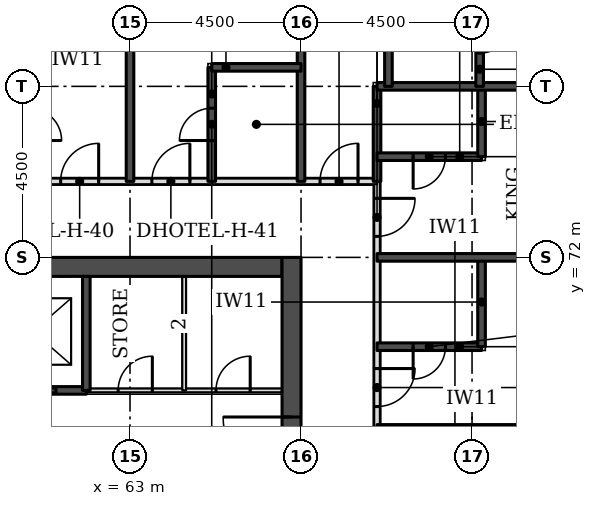
"""IFC4 building model, lengths in metres.
Left out: names, types, materials, properties, quantities, classifications, styles, units other than length and angle.
Written with IfcOpenShell. Run it as: python <this file> out.ifc"""

import sys

from ifc_helpers import new_model, si_unit, direction, frame, frame_2d, origin, place, context, subcontext, project, spatial, rectangle, extrude, element, fill, save


model = new_model("IFC4")
c1 = context("Model", 3, precision=1e-05, world=origin(), true_north=direction((0.0, 1.0)))
c2 = subcontext(c1, "Body", "Model", "MODEL_VIEW")
j1 = project(units=[si_unit("LENGTHUNIT", "METRE"), si_unit("PLANEANGLEUNIT", "RADIAN")], contexts=[c1])
p1 = place(None, origin())
s1 = spatial("IfcSite", under=j1, at=p1, CompositionType="ELEMENT")
p2 = place(p1, origin())
s2 = spatial("IfcBuilding", under=s1, at=p2, CompositionType="ELEMENT")
p3 = place(p2, frame((0.0, 0.0, 46.2)))
s3 = spatial("IfcBuildingStorey", under=s2, at=p3, CompositionType="ELEMENT", Elevation=46.2)
p4 = place(p3, frame((45.5, 71.75, 0.0), z_axis=(0.0, 0.0, 1.0), x_axis=(1.0, 0.0, 0.0)))
e1 = element("IfcWall", 1, at=p4, inside=s3, PredefinedType="SHEAR", context=c2, shape_type="SweptSolid", body=[
    extrude(rectangle(XDim=21.5, YDim=0.5, at=frame_2d((10.75, 0.0))), origin(), (0.0, 0.0, 1.0), 3.3),
])
p5 = place(p3, frame((67.25, 49.5, 0.0), z_axis=(0.0, 0.0, 1.0), x_axis=(0.0, 1.0, 0.0)))
e2 = element("IfcWall", 2, at=p5, inside=s3, PredefinedType="SHEAR", context=c2, shape_type="SweptSolid", body=[
    extrude(rectangle(XDim=22.5, YDim=0.5, at=frame_2d((11.25, 0.0))), origin(), (0.0, 0.0, 1.0), 3.3),
])
p6 = place(p5, frame((4.2, 0.0, 0.0)))
e3 = element("IfcOpeningElement", 3, at=p6, cuts=e2, PredefinedType="OPENING", context=c2, shape_type="SweptSolid", body=[
    extrude(rectangle(XDim=1.8, YDim=2.1, at=frame_2d((0.9, 1.05))), frame((0.0, 0.26, 0.0), z_axis=(0.0, -1.0, 0.0), x_axis=(1.0, 0.0, 0.0)), (0.0, 0.0, 1.0), 0.52),
])
p7 = place(p5, frame((6.9, 0.0, 0.0)))
e4 = element("IfcOpeningElement", 4, at=p7, cuts=e2, PredefinedType="OPENING", context=c2, shape_type="SweptSolid", body=[
    extrude(rectangle(XDim=1.1, YDim=2.1, at=frame_2d((0.55, 1.05))), frame((0.0, 0.26, 0.0), z_axis=(0.0, -1.0, 0.0), x_axis=(1.0, 0.0, 0.0)), (0.0, 0.0, 1.0), 0.52),
])
p8 = place(p5, frame((13.6, 0.0, 0.0)))
e5 = element("IfcOpeningElement", 5, at=p8, cuts=e2, PredefinedType="OPENING", context=c2, shape_type="SweptSolid", body=[
    extrude(rectangle(XDim=1.1, YDim=2.1, at=frame_2d((0.55, 1.05))), frame((0.0, 0.26, 0.0), z_axis=(0.0, -1.0, 0.0), x_axis=(1.0, 0.0, 0.0)), (0.0, 0.0, 1.0), 0.52),
])
p9 = place(p5, frame((16.5, 0.0, 0.0)))
e6 = element("IfcOpeningElement", 6, at=p9, cuts=e2, PredefinedType="OPENING", context=c2, shape_type="SweptSolid", body=[
    extrude(rectangle(XDim=1.8, YDim=2.1, at=frame_2d((0.9, 1.05))), frame((0.0, 0.26, 0.0), z_axis=(0.0, -1.0, 0.0), x_axis=(1.0, 0.0, 0.0)), (0.0, 0.0, 1.0), 0.52),
])
p10 = place(p3, frame((77.326, 76.77, 0.0), z_axis=(0.0, 0.0, 1.0), x_axis=(-0.707106781187, 0.707106781187, 0.0)))
e7 = element("IfcWall", 7, at=p10, inside=s3, PredefinedType="STANDARD", context=c2, shape_type="SweptSolid", body=[
    extrude(rectangle(XDim=7.151, YDim=0.35, at=frame_2d((3.576, 0.0))), origin(), (0.0, 0.0, 1.0), 3.055),
])
p11 = place(p10, frame((1.926, 0.0, 0.8)))
e8 = element("IfcOpeningElement", 8, at=p11, cuts=e7, PredefinedType="OPENING", context=c2, shape_type="SweptSolid", body=[
    extrude(rectangle(XDim=3.3, YDim=1.5, at=frame_2d((1.65, 0.75))), frame((0.0, 0.185, 0.0), z_axis=(0.0, -1.0, 0.0), x_axis=(1.0, 0.0, 0.0)), (0.0, 0.0, 1.0), 0.37),
])
p12 = place(p3, frame((69.5, 47.5, 0.0), z_axis=(0.0, 0.0, 1.0), x_axis=(0.0, 1.0, 0.0)))
e9 = element("IfcWall", 9, at=p12, inside=s3, PredefinedType="PARTITIONING", context=c2, shape_type="SweptSolid", body=[
    extrude(rectangle(XDim=26.5, YDim=0.15, at=frame_2d((13.25, 0.0))), origin(), (0.0, 0.0, 1.0), 3.08),
])
p13 = place(p12, frame((25.053, 0.0, 0.0)))
e10 = element("IfcOpeningElement", 10, at=p13, cuts=e9, PredefinedType="OPENING", context=c2, shape_type="SweptSolid", body=[
    extrude(rectangle(XDim=1.0, YDim=2.1, at=frame_2d((0.5, 1.05))), frame((0.0, 0.085, 0.0), z_axis=(0.0, -1.0, 0.0), x_axis=(1.0, 0.0, 0.0)), (0.0, 0.0, 1.0), 0.17),
])
p14 = place(p12, frame((20.575, 0.0, 0.0)))
e11 = element("IfcOpeningElement", 11, at=p14, cuts=e9, PredefinedType="OPENING", context=c2, shape_type="SweptSolid", body=[
    extrude(rectangle(XDim=1.0, YDim=2.1, at=frame_2d((0.5, 1.05))), frame((0.0, 0.085, 0.0), z_axis=(0.0, -1.0, 0.0), x_axis=(1.0, 0.0, 0.0)), (0.0, 0.0, 1.0), 0.17),
])
p15 = place(p12, frame((18.175, 0.0, 0.0)))
e12 = element("IfcOpeningElement", 12, at=p15, cuts=e9, PredefinedType="OPENING", context=c2, shape_type="SweptSolid", body=[
    extrude(rectangle(XDim=1.0, YDim=2.1, at=frame_2d((0.5, 1.05))), frame((0.0, 0.085, 0.0), z_axis=(0.0, -1.0, 0.0), x_axis=(1.0, 0.0, 0.0)), (0.0, 0.0, 1.0), 0.17),
])
p16 = place(p12, frame((11.575, 0.0, 0.0)))
e13 = element("IfcOpeningElement", 13, at=p16, cuts=e9, PredefinedType="OPENING", context=c2, shape_type="SweptSolid", body=[
    extrude(rectangle(XDim=1.0, YDim=2.1, at=frame_2d((0.5, 1.05))), frame((0.0, 0.085, 0.0), z_axis=(0.0, -1.0, 0.0), x_axis=(1.0, 0.0, 0.0)), (0.0, 0.0, 1.0), 0.17),
])
p17 = place(p12, frame((7.65, 0.0, 0.0)))
e14 = element("IfcOpeningElement", 14, at=p17, cuts=e9, PredefinedType="OPENING", context=c2, shape_type="SweptSolid", body=[
    extrude(rectangle(XDim=1.1, YDim=2.1, at=frame_2d((0.55, 1.05))), frame((0.0, 0.085, 0.0), z_axis=(0.0, -1.0, 0.0), x_axis=(1.0, 0.0, 0.0)), (0.0, 0.0, 1.0), 0.17),
])
p18 = place(p12, frame((0.447, 0.0, 0.0)))
e15 = element("IfcOpeningElement", 15, at=p18, cuts=e9, PredefinedType="OPENING", context=c2, shape_type="SweptSolid", body=[
    extrude(rectangle(XDim=1.0, YDim=2.1, at=frame_2d((0.5, 1.05))), frame((0.0, 0.085, 0.0), z_axis=(0.0, -1.0, 0.0), x_axis=(1.0, 0.0, 0.0)), (0.0, 0.0, 1.0), 0.17),
])
p19 = place(p3, frame((43.0, 74.0, 0.0), z_axis=(0.0, 0.0, 1.0), x_axis=(1.0, 0.0, 0.0)))
e16 = element("IfcWall", 16, at=p19, inside=s3, PredefinedType="PARTITIONING", context=c2, shape_type="SweptSolid", body=[
    extrude(rectangle(XDim=26.5, YDim=0.15, at=frame_2d((13.25, 0.0))), origin(), (0.0, 0.0, 1.0), 3.08),
])
p20 = place(p19, frame((2.575, 0.0, 0.0)))
e17 = element("IfcOpeningElement", 17, at=p20, cuts=e16, PredefinedType="OPENING", context=c2, shape_type="SweptSolid", body=[
    extrude(rectangle(XDim=1.0, YDim=2.1, at=frame_2d((0.5, 1.05))), frame((0.0, 0.085, 0.0), z_axis=(0.0, -1.0, 0.0), x_axis=(1.0, 0.0, 0.0)), (0.0, 0.0, 1.0), 0.17),
])
p21 = place(p19, frame((9.175, 0.0, 0.0)))
e18 = element("IfcOpeningElement", 18, at=p21, cuts=e16, PredefinedType="OPENING", context=c2, shape_type="SweptSolid", body=[
    extrude(rectangle(XDim=1.0, YDim=2.1, at=frame_2d((0.5, 1.05))), frame((0.0, 0.085, 0.0), z_axis=(0.0, -1.0, 0.0), x_axis=(1.0, 0.0, 0.0)), (0.0, 0.0, 1.0), 0.17),
])
p22 = place(p19, frame((11.575, 0.0, 0.0)))
e19 = element("IfcOpeningElement", 19, at=p22, cuts=e16, PredefinedType="OPENING", context=c2, shape_type="SweptSolid", body=[
    extrude(rectangle(XDim=1.0, YDim=2.1, at=frame_2d((0.5, 1.05))), frame((0.0, 0.085, 0.0), z_axis=(0.0, -1.0, 0.0), x_axis=(1.0, 0.0, 0.0)), (0.0, 0.0, 1.0), 0.17),
])
p23 = place(p19, frame((18.175, 0.0, 0.0)))
e20 = element("IfcOpeningElement", 20, at=p23, cuts=e16, PredefinedType="OPENING", context=c2, shape_type="SweptSolid", body=[
    extrude(rectangle(XDim=1.0, YDim=2.1, at=frame_2d((0.5, 1.05))), frame((0.0, 0.085, 0.0), z_axis=(0.0, -1.0, 0.0), x_axis=(1.0, 0.0, 0.0)), (0.0, 0.0, 1.0), 0.17),
])
p24 = place(p19, frame((20.575, 0.0, 0.0)))
e21 = element("IfcOpeningElement", 21, at=p24, cuts=e16, PredefinedType="OPENING", context=c2, shape_type="SweptSolid", body=[
    extrude(rectangle(XDim=1.0, YDim=2.1, at=frame_2d((0.5, 1.05))), frame((0.0, 0.085, 0.0), z_axis=(0.0, -1.0, 0.0), x_axis=(1.0, 0.0, 0.0)), (0.0, 0.0, 1.0), 0.17),
])
p25 = place(p19, frame((0.5, 0.0, 0.0)))
e22 = element("IfcOpeningElement", 22, at=p25, cuts=e16, PredefinedType="OPENING", context=c2, shape_type="SweptSolid", body=[
    extrude(rectangle(XDim=1.0, YDim=2.1, at=frame_2d((0.5, 1.05))), frame((0.0, 0.085, 0.0), z_axis=(0.0, -1.0, 0.0), x_axis=(1.0, 0.0, 0.0)), (0.0, 0.0, 1.0), 0.17),
])
p26 = place(p19, frame((25.0, 0.0, 0.0)))
e23 = element("IfcOpeningElement", 23, at=p26, cuts=e16, PredefinedType="OPENING", context=c2, shape_type="SweptSolid", body=[
    extrude(rectangle(XDim=1.0, YDim=2.1, at=frame_2d((0.5, 1.05))), frame((0.0, 0.085, 0.0), z_axis=(0.0, -1.0, 0.0), x_axis=(1.0, 0.0, 0.0)), (0.0, 0.0, 1.0), 0.17),
])
p27 = place(p3, frame((69.5, 67.5, 0.0), z_axis=(0.0, 0.0, 1.0), x_axis=(1.0, 0.0, 0.0)))
e24 = element("IfcWall", 24, at=p27, inside=s3, PredefinedType="SOLIDWALL", context=c2, shape_type="SweptSolid", body=[
    extrude(rectangle(XDim=6.4, YDim=0.2, at=frame_2d((3.2, 0.0))), origin(), (0.0, 0.0, 1.0), 3.08),
])
p28 = place(p3, frame((69.5, 69.65, 0.0), z_axis=(0.0, 0.0, 1.0), x_axis=(1.0, 0.0, 0.0)))
e25 = element("IfcWall", 25, at=p28, inside=s3, PredefinedType="SOLIDWALL", context=c2, shape_type="SweptSolid", body=[
    extrude(rectangle(XDim=2.75, YDim=0.2, at=frame_2d((1.375, 0.0))), origin(), (0.0, 0.0, 1.0), 3.08),
])
p29 = place(p28, frame((0.95, 0.0, 0.0)))
e26 = element("IfcOpeningElement", 26, at=p29, cuts=e25, PredefinedType="OPENING", context=c2, shape_type="SweptSolid", body=[
    extrude(rectangle(XDim=0.85, YDim=2.1, at=frame_2d((0.425, 1.05))), frame((0.0, 0.11, 0.0), z_axis=(0.0, -1.0, 0.0), x_axis=(1.0, 0.0, 0.0)), (0.0, 0.0, 1.0), 0.22),
])
p30 = place(p3, frame((72.25, 69.65, 0.0), z_axis=(0.0, 0.0, 1.0), x_axis=(0.0, 1.0, 0.0)))
e27 = element("IfcWall", 27, at=p30, inside=s3, PredefinedType="SOLIDWALL", context=c2, shape_type="SweptSolid", body=[
    extrude(rectangle(XDim=2.35, YDim=0.2, at=frame_2d((1.175, 0.0))), origin(), (0.0, 0.0, 1.0), 3.08),
])
for number, where, z_axis, x_axis in (
    (28, (69.5, 72.0, 0.0), (0.0, 0.0, 1.0), (1.0, 0.0, 0.0)),
    (29, (63.0, 74.0, 0.0), (0.0, 0.0, 1.0), (0.0, 1.0, 0.0)),
):
    element("IfcWall", number, at=place(p3, frame(where, z_axis=z_axis, x_axis=x_axis)), inside=s3, PredefinedType="SOLIDWALL", context=c2, shape_type="SweptSolid", body=[
        extrude(rectangle(XDim=6.4, YDim=0.2, at=frame_2d((3.2, 0.0))), origin(), (0.0, 0.0, 1.0), 3.08),
    ])
p31 = place(p3, frame((65.15, 74.0, 0.0), z_axis=(0.0, 0.0, 1.0), x_axis=(0.0, 1.0, 0.0)))
e30 = element("IfcWall", 30, at=p31, inside=s3, PredefinedType="SOLIDWALL", context=c2, shape_type="SweptSolid", body=[
    extrude(rectangle(XDim=3.0, YDim=0.2, at=frame_2d((1.5, 0.0))), origin(), (0.0, 0.0, 1.0), 3.08),
])
p32 = place(p31, frame((1.075, 0.0, 0.0)))
e31 = element("IfcOpeningElement", 31, at=p32, cuts=e30, PredefinedType="OPENING", context=c2, shape_type="SweptSolid", body=[
    extrude(rectangle(XDim=0.85, YDim=2.1, at=frame_2d((0.425, 1.05))), frame((0.0, 0.11, 0.0), z_axis=(0.0, -1.0, 0.0), x_axis=(1.0, 0.0, 0.0)), (0.0, 0.0, 1.0), 0.22),
])
p33 = place(p3, frame((67.5, 74.0, 0.0), z_axis=(0.0, 0.0, 1.0), x_axis=(0.0, 1.0, 0.0)))
e32 = element("IfcWall", 32, at=p33, inside=s3, PredefinedType="SOLIDWALL", context=c2, shape_type="SweptSolid", body=[
    extrude(rectangle(XDim=6.4, YDim=0.2, at=frame_2d((3.2, 0.0))), origin(), (0.0, 0.0, 1.0), 3.08),
])
p34 = place(p3, frame((69.5, 74.0, 0.0), z_axis=(0.0, 0.0, 1.0), x_axis=(0.0, 1.0, 0.0)))
e33 = element("IfcWall", 33, at=p34, inside=s3, PredefinedType="SOLIDWALL", context=c2, shape_type="SweptSolid", body=[
    extrude(rectangle(XDim=2.5, YDim=0.2, at=frame_2d((1.25, 0.0))), origin(), (0.0, 0.0, 1.0), 3.08),
])
p35 = place(p3, frame((69.5, 74.65, 0.0), z_axis=(0.0, 0.0, 1.0), x_axis=(1.0, 0.0, 0.0)))
e34 = element("IfcWall", 34, at=p35, inside=s3, PredefinedType="SOLIDWALL", context=c2, shape_type="SweptSolid", body=[
    extrude(rectangle(XDim=2.75, YDim=0.2, at=frame_2d((1.375, 0.0))), origin(), (0.0, 0.0, 1.0), 3.08),
])
p36 = place(p35, frame((0.95, 0.0, 0.0)))
e35 = element("IfcOpeningElement", 35, at=p36, cuts=e34, PredefinedType="OPENING", context=c2, shape_type="SweptSolid", body=[
    extrude(rectangle(XDim=0.85, YDim=2.1, at=frame_2d((0.425, 1.05))), frame((0.0, 0.11, 0.0), z_axis=(0.0, -1.0, 0.0), x_axis=(1.0, 0.0, 0.0)), (0.0, 0.0, 1.0), 0.22),
])
p37 = place(p3, frame((72.25, 74.65, 0.0), z_axis=(0.0, 0.0, 1.0), x_axis=(0.0, 1.0, 0.0)))
e36 = element("IfcWall", 36, at=p37, inside=s3, PredefinedType="SOLIDWALL", context=c2, shape_type="SweptSolid", body=[
    extrude(rectangle(XDim=1.85, YDim=0.2, at=frame_2d((0.925, 0.0))), origin(), (0.0, 0.0, 1.0), 3.08),
])
p38 = place(p3, frame((69.5, 76.5, 0.0), z_axis=(0.0, 0.0, 1.0), x_axis=(1.0, 0.0, 0.0)))
e37 = element("IfcWall", 37, at=p38, inside=s3, PredefinedType="SOLIDWALL", context=c2, shape_type="SweptSolid", body=[
    extrude(rectangle(XDim=6.4, YDim=0.2, at=frame_2d((3.2, 0.0))), origin(), (0.0, 0.0, 1.0), 3.08),
])
p39 = place(p3, frame((69.8, 76.5, 0.0), z_axis=(0.0, 0.0, 1.0), x_axis=(0.0, 1.0, 0.0)))
e38 = element("IfcWall", 38, at=p39, inside=s3, PredefinedType="SOLIDWALL", context=c2, shape_type="SweptSolid", body=[
    extrude(rectangle(XDim=2.5, YDim=0.2, at=frame_2d((1.25, 0.0))), origin(), (0.0, 0.0, 1.0), 3.08),
])
p40 = place(p3, frame((72.2, 76.5, 0.0), z_axis=(0.0, 0.0, 1.0), x_axis=(0.0, 1.0, 0.0)))
e39 = element("IfcWall", 39, at=p40, inside=s3, PredefinedType="SOLIDWALL", context=c2, shape_type="SweptSolid", body=[
    extrude(rectangle(XDim=2.5, YDim=0.2, at=frame_2d((1.25, 0.0))), origin(), (0.0, 0.0, 1.0), 3.08),
])
p41 = place(p40, frame((0.875, 0.0, 0.0)))
e40 = element("IfcOpeningElement", 40, at=p41, cuts=e39, PredefinedType="OPENING", context=c2, shape_type="SweptSolid", body=[
    extrude(rectangle(XDim=0.85, YDim=2.1, at=frame_2d((0.425, 1.05))), frame((0.0, 0.11, 0.0), z_axis=(0.0, -1.0, 0.0), x_axis=(1.0, 0.0, 0.0)), (0.0, 0.0, 1.0), 0.22),
])
p42 = place(p3, frame((65.15, 77.0, 0.0), z_axis=(0.0, 0.0, 1.0), x_axis=(1.0, 0.0, 0.0)))
e41 = element("IfcWall", 41, at=p42, inside=s3, PredefinedType="SOLIDWALL", context=c2, shape_type="SweptSolid", body=[
    extrude(rectangle(XDim=2.35, YDim=0.2, at=frame_2d((1.175, 0.0))), origin(), (0.0, 0.0, 1.0), 3.08),
])
p43 = place(p3, frame((61.85, 68.5, 0.0), z_axis=(0.0, 0.0, 1.0), x_axis=(1.0, 0.0, 0.0)))
e42 = element("IfcWall", 42, at=p43, inside=s3, PredefinedType="PARTITIONING", context=c2, shape_type="SweptSolid", body=[
    extrude(rectangle(XDim=5.15, YDim=0.1, at=frame_2d((2.575, 0.0))), origin(), (0.0, 0.0, 1.0), 3.08),
])
p44 = place(p43, frame((3.413, 0.0, 0.0)))
e43 = element("IfcOpeningElement", 43, at=p44, cuts=e42, PredefinedType="OPENING", context=c2, shape_type="SweptSolid", body=[
    extrude(rectangle(XDim=0.9, YDim=2.1, at=frame_2d((0.45, 1.05))), frame((0.0, 0.06, 0.0), z_axis=(0.0, -1.0, 0.0), x_axis=(1.0, 0.0, 0.0)), (0.0, 0.0, 1.0), 0.12),
])
p45 = place(p43, frame((0.837, 0.0, 0.0)))
e44 = element("IfcOpeningElement", 44, at=p45, cuts=e42, PredefinedType="OPENING", context=c2, shape_type="SweptSolid", body=[
    extrude(rectangle(XDim=0.9, YDim=2.1, at=frame_2d((0.45, 1.05))), frame((0.0, 0.06, 0.0), z_axis=(0.0, -1.0, 0.0), x_axis=(1.0, 0.0, 0.0)), (0.0, 0.0, 1.0), 0.12),
])
p46 = place(p3, frame((50.65, 68.5, 0.0), z_axis=(0.0, 0.0, 1.0), x_axis=(1.0, 0.0, 0.0)))
e45 = element("IfcWall", 45, at=p46, inside=s3, PredefinedType="SOLIDWALL", context=c2, shape_type="SweptSolid", body=[
    extrude(rectangle(XDim=11.2, YDim=0.2, at=frame_2d((5.6, 0.0))), origin(), (0.0, 0.0, 1.0), 3.08),
])
p47 = place(p46, frame((0.8, 0.0, 0.0)))
e46 = element("IfcOpeningElement", 46, at=p47, cuts=e45, PredefinedType="OPENING", context=c2, shape_type="SweptSolid", body=[
    extrude(rectangle(XDim=1.2, YDim=2.1, at=frame_2d((0.6, 1.05))), frame((0.0, 0.11, 0.0), z_axis=(0.0, -1.0, 0.0), x_axis=(1.0, 0.0, 0.0)), (0.0, 0.0, 1.0), 0.22),
])
p48 = place(p46, frame((3.6, 0.0, 0.0)))
e47 = element("IfcOpeningElement", 47, at=p48, cuts=e45, PredefinedType="OPENING", context=c2, shape_type="SweptSolid", body=[
    extrude(rectangle(XDim=1.2, YDim=2.1, at=frame_2d((0.6, 1.05))), frame((0.0, 0.11, 0.0), z_axis=(0.0, -1.0, 0.0), x_axis=(1.0, 0.0, 0.0)), (0.0, 0.0, 1.0), 0.22),
])
p49 = place(p46, frame((6.4, 0.0, 0.0)))
e48 = element("IfcOpeningElement", 48, at=p49, cuts=e45, PredefinedType="OPENING", context=c2, shape_type="SweptSolid", body=[
    extrude(rectangle(XDim=1.2, YDim=2.1, at=frame_2d((0.6, 1.05))), frame((0.0, 0.11, 0.0), z_axis=(0.0, -1.0, 0.0), x_axis=(1.0, 0.0, 0.0)), (0.0, 0.0, 1.0), 0.22),
])
p50 = place(p46, frame((9.2, 0.0, 0.0)))
e49 = element("IfcOpeningElement", 49, at=p50, cuts=e45, PredefinedType="OPENING", context=c2, shape_type="SweptSolid", body=[
    extrude(rectangle(XDim=1.2, YDim=2.1, at=frame_2d((0.6, 1.05))), frame((0.0, 0.11, 0.0), z_axis=(0.0, -1.0, 0.0), x_axis=(1.0, 0.0, 0.0)), (0.0, 0.0, 1.0), 0.22),
])
p51 = place(p3, frame((61.85, 68.5, 0.0), z_axis=(0.0, 0.0, 1.0), x_axis=(0.0, 1.0, 0.0)))
e50 = element("IfcWall", 50, at=p51, inside=s3, PredefinedType="SOLIDWALL", context=c2, shape_type="SweptSolid", body=[
    extrude(rectangle(XDim=3.0, YDim=0.2, at=frame_2d((1.5, 0.0))), origin(), (0.0, 0.0, 1.0), 3.08),
])
p52 = place(p3, frame((64.425, 68.5, 0.0), z_axis=(0.0, 0.0, 1.0), x_axis=(0.0, 1.0, 0.0)))
e51 = element("IfcWall", 51, at=p52, inside=s3, PredefinedType="PARTITIONING", context=c2, shape_type="SweptSolid", body=[
    extrude(rectangle(XDim=3.0, YDim=0.1, at=frame_2d((1.5, 0.0))), origin(), (0.0, 0.0, 1.0), 3.08),
])
p53 = place(p23, origin())
e52 = element("IfcDoor", 52, at=p53, inside=s3, OperationType="SINGLE_SWING_RIGHT", PredefinedType="DOOR", context=c2, shape_type="SweptSolid", body=[
    extrude(rectangle(XDim=1.0, YDim=2.1, at=frame_2d((0.5, 1.05))), frame((0.0, 0.025, 0.0), z_axis=(0.0, -1.0, 0.0), x_axis=(1.0, 0.0, 0.0)), (0.0, 0.0, 1.0), 0.05),
])
fill(e20, e52)
p54 = place(p24, origin())
e53 = element("IfcDoor", 53, at=p54, inside=s3, OperationType="SINGLE_SWING_RIGHT", PredefinedType="DOOR", context=c2, shape_type="SweptSolid", body=[
    extrude(rectangle(XDim=1.0, YDim=2.1, at=frame_2d((0.5, 1.05))), frame((0.0, 0.025, 0.0), z_axis=(0.0, -1.0, 0.0), x_axis=(1.0, 0.0, 0.0)), (0.0, 0.0, 1.0), 0.05),
])
fill(e21, e53)
p55 = place(p32, origin())
e54 = element("IfcDoor", 54, at=p55, inside=s3, OperationType="SINGLE_SWING_LEFT", PredefinedType="DOOR", context=c2, shape_type="SweptSolid", body=[
    extrude(rectangle(XDim=0.85, YDim=2.1, at=frame_2d((0.425, 1.05))), frame((0.0, 0.025, 0.0), z_axis=(0.0, -1.0, 0.0), x_axis=(1.0, 0.0, 0.0)), (0.0, 0.0, 1.0), 0.05),
])
fill(e31, e54)
p56 = place(p13, frame((1.0, 0.0, 0.0), z_axis=(0.0, 0.0, 1.0), x_axis=(-1.0, 0.0, 0.0)))
e55 = element("IfcDoor", 55, at=p56, inside=s3, OperationType="SINGLE_SWING_LEFT", PredefinedType="DOOR", context=c2, shape_type="SweptSolid", body=[
    extrude(rectangle(XDim=1.0, YDim=2.1, at=frame_2d((0.5, 1.05))), frame((0.0, 0.025, 0.0), z_axis=(0.0, -1.0, 0.0), x_axis=(1.0, 0.0, 0.0)), (0.0, 0.0, 1.0), 0.05),
])
fill(e10, e55)
p57 = place(p36, frame((0.85, 0.0, 0.0), z_axis=(0.0, 0.0, 1.0), x_axis=(-1.0, 0.0, 0.0)))
e56 = element("IfcDoor", 56, at=p57, inside=s3, OperationType="SINGLE_SWING_RIGHT", PredefinedType="DOOR", context=c2, shape_type="SweptSolid", body=[
    extrude(rectangle(XDim=0.85, YDim=2.1, at=frame_2d((0.425, 1.05))), frame((0.0, 0.025, 0.0), z_axis=(0.0, -1.0, 0.0), x_axis=(1.0, 0.0, 0.0)), (0.0, 0.0, 1.0), 0.05),
])
fill(e35, e56)
p58 = place(p14, frame((1.0, 0.0, 0.0), z_axis=(0.0, 0.0, 1.0), x_axis=(-1.0, 0.0, 0.0)))
e57 = element("IfcDoor", 57, at=p58, inside=s3, OperationType="SINGLE_SWING_LEFT", PredefinedType="DOOR", context=c2, shape_type="SweptSolid", body=[
    extrude(rectangle(XDim=1.0, YDim=2.1, at=frame_2d((0.5, 1.05))), frame((0.0, 0.025, 0.0), z_axis=(0.0, -1.0, 0.0), x_axis=(1.0, 0.0, 0.0)), (0.0, 0.0, 1.0), 0.05),
])
fill(e11, e57)
p59 = place(p29, frame((0.85, 0.0, 0.0), z_axis=(0.0, 0.0, 1.0), x_axis=(-1.0, 0.0, 0.0)))
e58 = element("IfcDoor", 58, at=p59, inside=s3, OperationType="SINGLE_SWING_RIGHT", PredefinedType="DOOR", context=c2, shape_type="SweptSolid", body=[
    extrude(rectangle(XDim=0.85, YDim=2.1, at=frame_2d((0.425, 1.05))), frame((0.0, 0.025, 0.0), z_axis=(0.0, -1.0, 0.0), x_axis=(1.0, 0.0, 0.0)), (0.0, 0.0, 1.0), 0.05),
])
fill(e26, e58)
p60 = place(p26, origin())
e59 = element("IfcDoor", 59, at=p60, inside=s3, OperationType="SINGLE_SWING_RIGHT", PredefinedType="DOOR", context=c2, shape_type="SweptSolid", body=[
    extrude(rectangle(XDim=1.0, YDim=2.1, at=frame_2d((0.5, 1.05))), frame((0.0, 0.025, 0.0), z_axis=(0.0, -1.0, 0.0), x_axis=(1.0, 0.0, 0.0)), (0.0, 0.0, 1.0), 0.05),
])
fill(e23, e59)
p61 = place(p41, frame((0.85, 0.0, 0.0), z_axis=(0.0, 0.0, 1.0), x_axis=(-1.0, 0.0, 0.0)))
e60 = element("IfcDoor", 60, at=p61, inside=s3, OperationType="SINGLE_SWING_LEFT", PredefinedType="DOOR", context=c2, shape_type="SweptSolid", body=[
    extrude(rectangle(XDim=0.85, YDim=2.1, at=frame_2d((0.425, 1.05))), frame((0.0, 0.025, 0.0), z_axis=(0.0, -1.0, 0.0), x_axis=(1.0, 0.0, 0.0)), (0.0, 0.0, 1.0), 0.05),
])
fill(e40, e60)
p62 = place(p50, origin())
e61 = element("IfcDoor", 61, at=p62, inside=s3, OperationType="DOUBLE_DOOR_SLIDING", PredefinedType="DOOR", context=c2, shape_type="SweptSolid", body=[
    extrude(rectangle(XDim=1.2, YDim=2.1, at=frame_2d((0.6, 1.05))), frame((0.0, 0.025, 0.0), z_axis=(0.0, -1.0, 0.0), x_axis=(1.0, 0.0, 0.0)), (0.0, 0.0, 1.0), 0.05),
])
fill(e49, e61)
p63 = place(p9, origin())
e62 = element("IfcDoor", 62, at=p63, inside=s3, OperationType="SINGLE_SWING_RIGHT", PredefinedType="DOOR", context=c2, shape_type="SweptSolid", body=[
    extrude(rectangle(XDim=1.8, YDim=2.1, at=frame_2d((0.9, 1.05))), frame((0.0, 0.025, 0.0), z_axis=(0.0, -1.0, 0.0), x_axis=(1.0, 0.0, 0.0)), (0.0, 0.0, 1.0), 0.05),
])
fill(e6, e62)
p64 = place(p44, origin())
e63 = element("IfcDoor", 63, at=p64, inside=s3, OperationType="SINGLE_SWING_RIGHT", PredefinedType="DOOR", context=c2, shape_type="SweptSolid", body=[
    extrude(rectangle(XDim=0.9, YDim=2.1, at=frame_2d((0.45, 1.05))), frame((0.0, 0.025, 0.0), z_axis=(0.0, -1.0, 0.0), x_axis=(1.0, 0.0, 0.0)), (0.0, 0.0, 1.0), 0.05),
])
fill(e43, e63)
p65 = place(p45, origin())
e64 = element("IfcDoor", 64, at=p65, inside=s3, OperationType="SINGLE_SWING_RIGHT", PredefinedType="DOOR", context=c2, shape_type="SweptSolid", body=[
    extrude(rectangle(XDim=0.9, YDim=2.1, at=frame_2d((0.45, 1.05))), frame((0.0, 0.025, 0.0), z_axis=(0.0, -1.0, 0.0), x_axis=(1.0, 0.0, 0.0)), (0.0, 0.0, 1.0), 0.05),
])
fill(e44, e64)
save(model, sys.argv[1])
